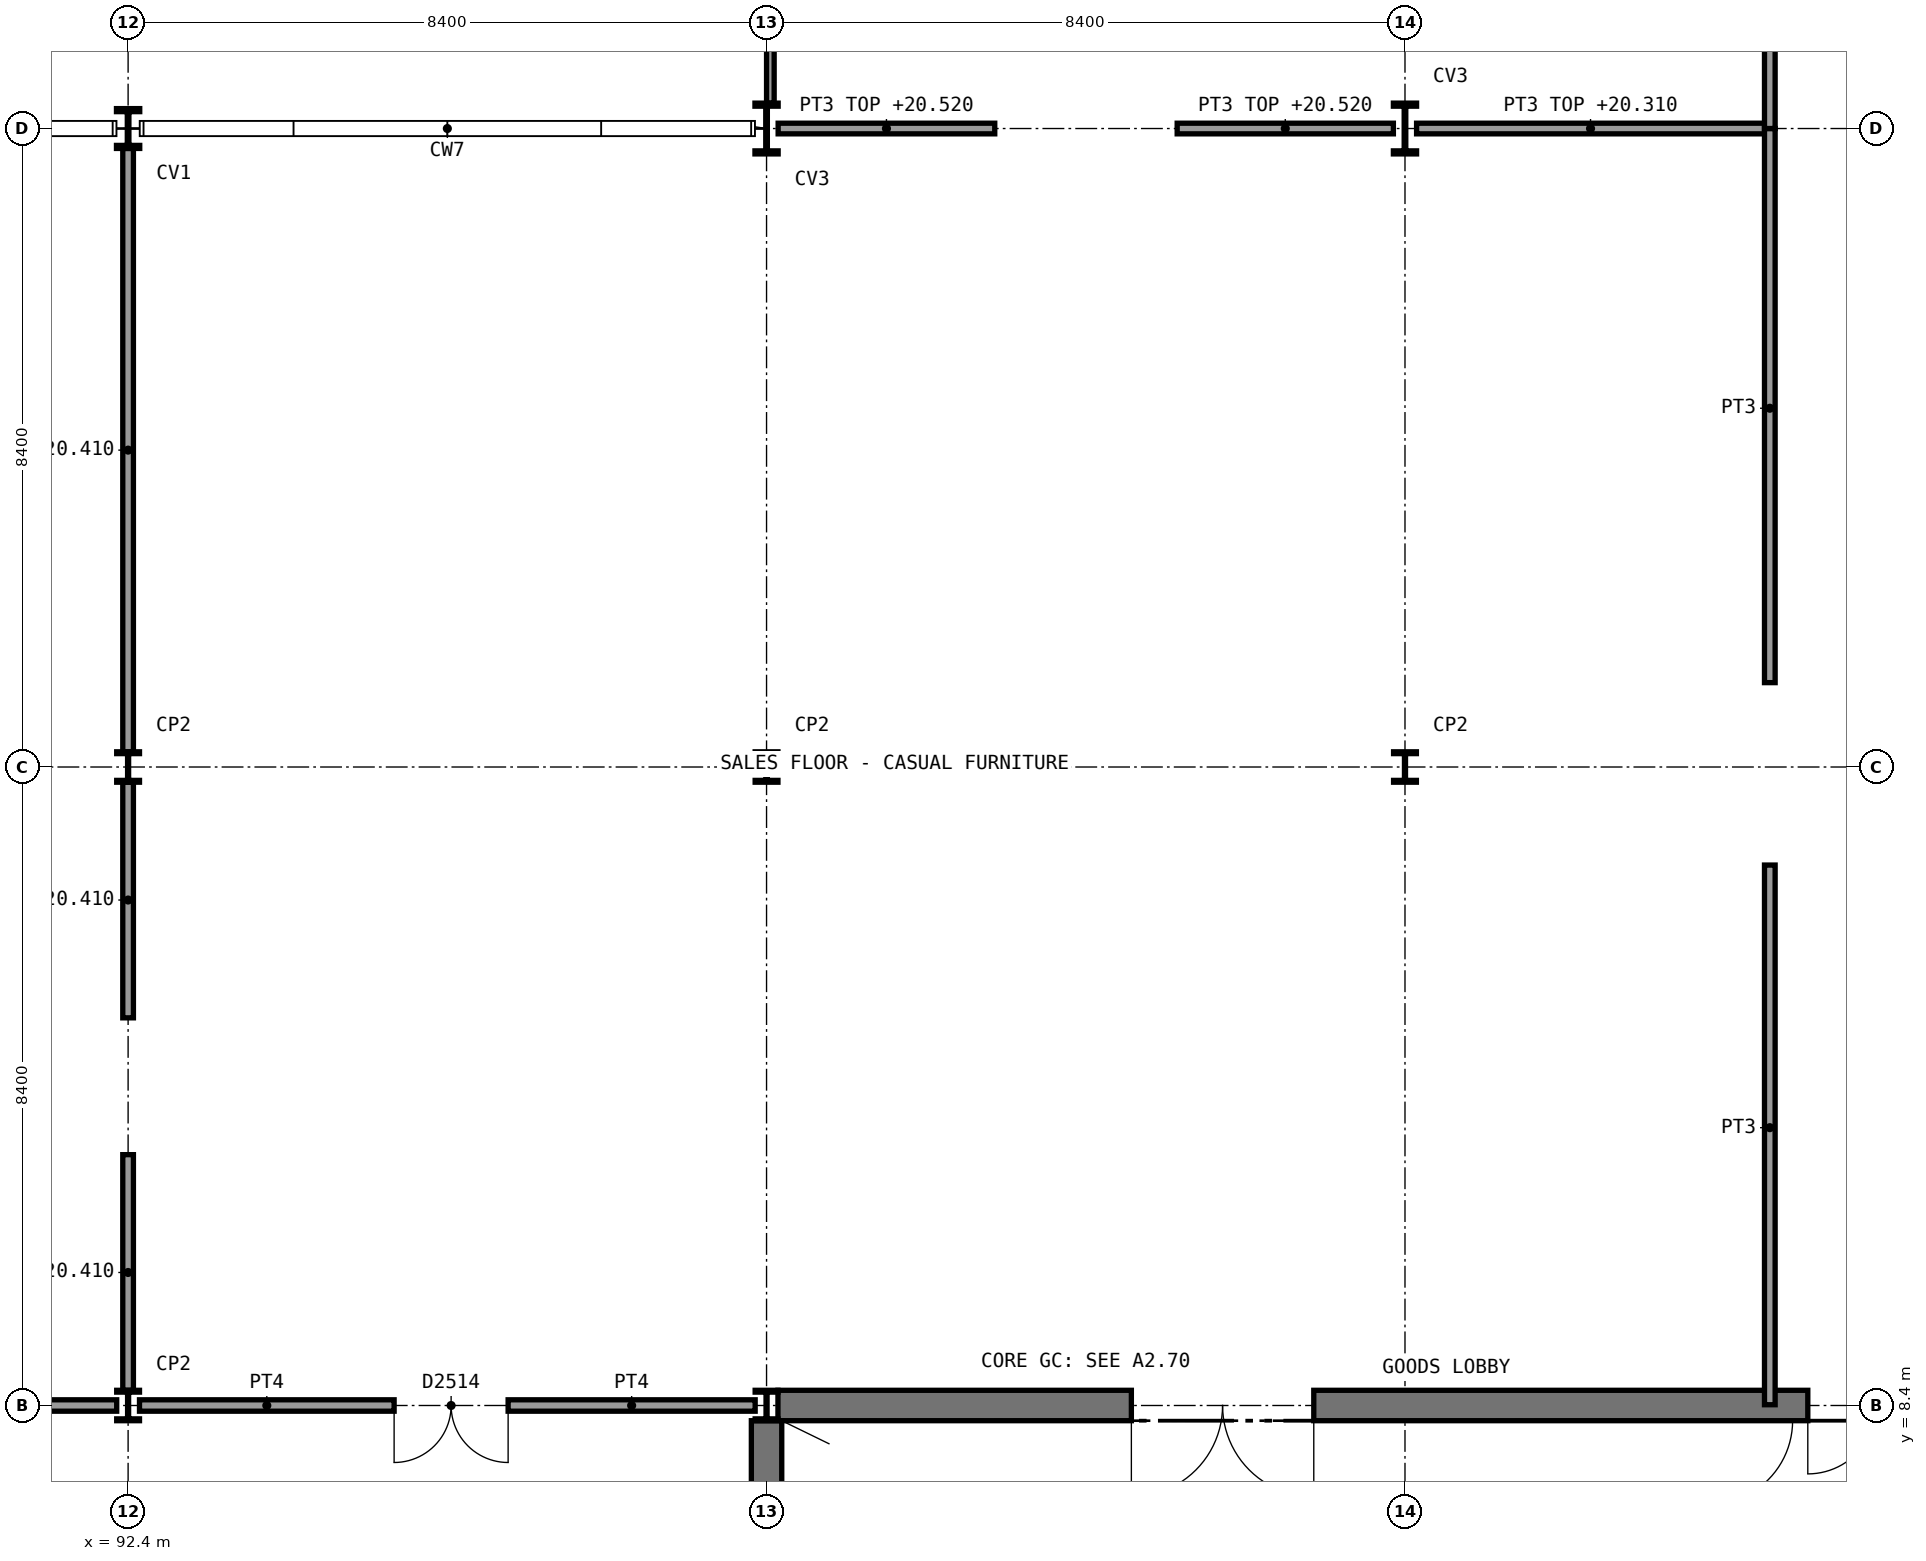
"""IFC4 building model, lengths in metres.
Left out: names, types, materials, properties, quantities, classifications, styles, units other than length and angle.
Written with IfcOpenShell. Run it as: python <this file> out.ifc"""

import sys

from ifc_helpers import new_model, si_unit, direction, frame, frame_2d, origin, origin_2d, place, context, subcontext, project, spatial, rectangle, i_section, extrude, element, fill, save


model = new_model("IFC4")
c1 = context("Model", 3, precision=1e-05, world=origin(), true_north=direction((0.0, 1.0)))
c2 = subcontext(c1, "Body", "Model", "MODEL_VIEW")
j1 = project(units=[si_unit("LENGTHUNIT", "METRE"), si_unit("PLANEANGLEUNIT", "RADIAN")], contexts=[c1])
p1 = place(None, origin())
s1 = spatial("IfcSite", under=j1, at=p1, CompositionType="ELEMENT")
p2 = place(p1, origin())
s2 = spatial("IfcBuilding", under=s1, at=p2, CompositionType="ELEMENT")
p3 = place(p2, frame((0.0, 0.0, 16.2)))
s3 = spatial("IfcBuildingStorey", under=s2, at=p3, CompositionType="ELEMENT", Elevation=16.2)
p4 = place(p3, frame((100.95, 8.4, 0.0), z_axis=(0.0, 0.0, 1.0), x_axis=(1.0, 0.0, 0.0)))
e1 = element("IfcWall", 1, at=p4, inside=s3, PredefinedType="SHEAR", context=c2, shape_type="SweptSolid", body=[
    extrude(rectangle(XDim=16.45, YDim=0.4, at=frame_2d((8.225, 0.0))), origin(), (0.0, 0.0, 1.0), 4.65),
])
p5 = place(p4, frame((13.55, 0.0, 0.0)))
e2 = element("IfcOpeningElement", 2, at=p5, cuts=e1, PredefinedType="OPENING", context=c2, shape_type="SweptSolid", body=[
    extrude(rectangle(XDim=1.8, YDim=2.1, at=frame_2d((0.9, 1.05))), frame((0.0, 0.21, 0.0), z_axis=(0.0, -1.0, 0.0), x_axis=(1.0, 0.0, 0.0)), (0.0, 0.0, 1.0), 0.42),
])
p6 = place(p4, frame((4.65, 0.0, 0.0)))
e3 = element("IfcOpeningElement", 3, at=p6, cuts=e1, PredefinedType="OPENING", context=c2, shape_type="SweptSolid", body=[
    extrude(rectangle(XDim=2.4, YDim=2.4, at=frame_2d((1.2, 1.2))), frame((0.0, 0.21, 0.0), z_axis=(0.0, -1.0, 0.0), x_axis=(1.0, 0.0, 0.0)), (0.0, 0.0, 1.0), 0.42),
])
p7 = place(p3, frame((100.8, 0.2, 0.0), z_axis=(0.0, 0.0, 1.0), x_axis=(0.0, 1.0, 0.0)))
e4 = element("IfcWall", 4, at=p7, inside=s3, PredefinedType="SHEAR", context=c2, shape_type="SweptSolid", body=[
    extrude(rectangle(XDim=8.0, YDim=0.4, at=frame_2d((4.0, 0.0))), origin(), (0.0, 0.0, 1.0), 4.65),
])
for number, where, z_axis, x_axis in (
    (5, (92.4, 8.4, 0.0), (0.0, 0.0, 1.0), (1.0, 0.0, 0.0)),
    (6, (92.4, 16.8, 0.0), (0.0, 0.0, 1.0), (1.0, 0.0, 0.0)),
):
    element("IfcColumn", number, at=place(p3, frame(where, z_axis=z_axis, x_axis=x_axis)), inside=s3, PredefinedType="COLUMN", context=c2, shape_type="SweptSolid", body=[
        extrude(i_section(OverallWidth=0.3, OverallDepth=0.4, WebThickness=0.013, FlangeThickness=0.024, FilletRadius=0.027, at=origin_2d()), origin(), (0.0, 0.0, 1.0), 4.8),
    ])
p8 = place(p3, frame((92.4, 25.2, 0.0), z_axis=(0.0, 0.0, 1.0), x_axis=(1.0, 0.0, 0.0)))
e7 = element("IfcColumn", 7, at=p8, inside=s3, PredefinedType="COLUMN", context=c2, shape_type="SweptSolid", body=[
    extrude(i_section(OverallWidth=0.306, OverallDepth=0.524, WebThickness=0.021, FlangeThickness=0.04, FilletRadius=0.027, at=origin_2d()), origin(), (0.0, 0.0, 1.0), 4.8),
])
for number, where, z_axis, x_axis in (
    (8, (100.8, 8.4, 0.0), (0.0, 0.0, 1.0), (1.0, 0.0, 0.0)),
    (9, (100.8, 16.8, 0.0), (0.0, 0.0, 1.0), (1.0, 0.0, 0.0)),
):
    element("IfcColumn", number, at=place(p3, frame(where, z_axis=z_axis, x_axis=x_axis)), inside=s3, PredefinedType="COLUMN", context=c2, shape_type="SweptSolid", body=[
        extrude(i_section(OverallWidth=0.3, OverallDepth=0.4, WebThickness=0.013, FlangeThickness=0.024, FilletRadius=0.027, at=origin_2d()), origin(), (0.0, 0.0, 1.0), 4.8),
    ])
p9 = place(p3, frame((100.8, 25.2, 0.0), z_axis=(0.0, 0.0, 1.0), x_axis=(1.0, 0.0, 0.0)))
e10 = element("IfcColumn", 10, at=p9, inside=s3, PredefinedType="COLUMN", context=c2, shape_type="SweptSolid", body=[
    extrude(i_section(OverallWidth=0.305, OverallDepth=0.668, WebThickness=0.021, FlangeThickness=0.04, FilletRadius=0.027, at=origin_2d()), origin(), (0.0, 0.0, 1.0), 4.8),
])
p10 = place(p3, frame((109.2, 16.8, 0.0), z_axis=(0.0, 0.0, 1.0), x_axis=(1.0, 0.0, 0.0)))
e11 = element("IfcColumn", 11, at=p10, inside=s3, PredefinedType="COLUMN", context=c2, shape_type="SweptSolid", body=[
    extrude(i_section(OverallWidth=0.3, OverallDepth=0.4, WebThickness=0.013, FlangeThickness=0.024, FilletRadius=0.027, at=origin_2d()), origin(), (0.0, 0.0, 1.0), 4.8),
])
p11 = place(p3, frame((109.2, 25.2, 0.0), z_axis=(0.0, 0.0, 1.0), x_axis=(1.0, 0.0, 0.0)))
e12 = element("IfcColumn", 12, at=p11, inside=s3, PredefinedType="COLUMN", context=c2, shape_type="SweptSolid", body=[
    extrude(i_section(OverallWidth=0.305, OverallDepth=0.668, WebThickness=0.021, FlangeThickness=0.04, FilletRadius=0.027, at=origin_2d()), origin(), (0.0, 0.0, 1.0), 4.8),
])
p12 = place(p3, frame((84.15, 8.4, 0.0), z_axis=(0.0, 0.0, 1.0), x_axis=(1.0, 0.0, 0.0)))
e13 = element("IfcWall", 13, at=p12, inside=s3, PredefinedType="SOLIDWALL", context=c2, shape_type="SweptSolid", body=[
    extrude(rectangle(XDim=8.1, YDim=0.15, at=frame_2d((4.05, 0.0))), origin(), (0.0, 0.0, 1.0), 4.32),
])
p13 = place(p12, frame((3.35, 0.0, 0.0)))
e14 = element("IfcOpeningElement", 14, at=p13, cuts=e13, PredefinedType="OPENING", context=c2, shape_type="SweptSolid", body=[
    extrude(rectangle(XDim=1.5, YDim=2.1, at=frame_2d((0.75, 1.05))), frame((0.0, 0.085, 0.0), z_axis=(0.0, -1.0, 0.0), x_axis=(1.0, 0.0, 0.0)), (0.0, 0.0, 1.0), 0.17),
])
p14 = place(p3, frame((92.55, 8.4, 0.0), z_axis=(0.0, 0.0, 1.0), x_axis=(1.0, 0.0, 0.0)))
e15 = element("IfcWall", 15, at=p14, inside=s3, PredefinedType="SOLIDWALL", context=c2, shape_type="SweptSolid", body=[
    extrude(rectangle(XDim=8.1, YDim=0.15, at=frame_2d((4.05, 0.0))), origin(), (0.0, 0.0, 1.0), 4.32),
])
p15 = place(p14, frame((3.35, 0.0, 0.0)))
e16 = element("IfcOpeningElement", 16, at=p15, cuts=e15, PredefinedType="OPENING", context=c2, shape_type="SweptSolid", body=[
    extrude(rectangle(XDim=1.5, YDim=2.1, at=frame_2d((0.75, 1.05))), frame((0.0, 0.085, 0.0), z_axis=(0.0, -1.0, 0.0), x_axis=(1.0, 0.0, 0.0)), (0.0, 0.0, 1.0), 0.17),
])
for number, where, z_axis, x_axis in (
    (17, (92.4, 8.6, 0.0), (0.0, 0.0, 1.0), (0.0, 1.0, 0.0)),
    (18, (92.4, 13.5, 0.0), (0.0, 0.0, 1.0), (0.0, 1.0, 0.0)),
):
    element("IfcWall", number, at=place(p3, frame(where, z_axis=z_axis, x_axis=x_axis)), inside=s3, PredefinedType="PARTITIONING", context=c2, shape_type="SweptSolid", body=[
        extrude(rectangle(XDim=3.1, YDim=0.14, at=frame_2d((1.55, 0.0))), origin(), (0.0, 0.0, 1.0), 4.21),
    ])
p16 = place(p3, frame((92.4, 17.0, 0.0), z_axis=(0.0, 0.0, 1.0), x_axis=(0.0, 1.0, 0.0)))
e19 = element("IfcWall", 19, at=p16, inside=s3, PredefinedType="PARTITIONING", context=c2, shape_type="SweptSolid", body=[
    extrude(rectangle(XDim=7.938, YDim=0.14, at=frame_2d((3.969, 0.0))), origin(), (0.0, 0.0, 1.0), 4.21),
])
p17 = place(p3, frame((100.953, 25.2, 0.0), z_axis=(0.0, 0.0, 1.0), x_axis=(1.0, 0.0, 0.0)))
e20 = element("IfcWall", 20, at=p17, inside=s3, PredefinedType="PARTITIONING", context=c2, shape_type="SweptSolid", body=[
    extrude(rectangle(XDim=2.85, YDim=0.14, at=frame_2d((1.425, 0.0))), origin(), (0.0, 0.0, 1.0), 4.32),
])
p18 = place(p3, frame((106.203, 25.2, 0.0), z_axis=(0.0, 0.0, 1.0), x_axis=(1.0, 0.0, 0.0)))
e21 = element("IfcWall", 21, at=p18, inside=s3, PredefinedType="PARTITIONING", context=c2, shape_type="SweptSolid", body=[
    extrude(rectangle(XDim=2.845, YDim=0.14, at=frame_2d((1.422, 0.0))), origin(), (0.0, 0.0, 1.0), 4.32),
])
p19 = place(p3, frame((109.353, 25.2, 0.0), z_axis=(0.0, 0.0, 1.0), x_axis=(1.0, 0.0, 0.0)))
e22 = element("IfcWall", 22, at=p19, inside=s3, PredefinedType="PARTITIONING", context=c2, shape_type="SweptSolid", body=[
    extrude(rectangle(XDim=4.647, YDim=0.14, at=frame_2d((2.324, 0.0))), origin(), (0.0, 0.0, 1.0), 4.11),
])
p20 = place(p3, frame((114.0, 8.41, 0.0), z_axis=(0.0, 0.0, 1.0), x_axis=(0.0, 1.0, 0.0)))
e23 = element("IfcWall", 23, at=p20, inside=s3, PredefinedType="PARTITIONING", context=c2, shape_type="SweptSolid", body=[
    extrude(rectangle(XDim=7.1, YDim=0.14, at=frame_2d((3.55, 0.0))), origin(), (0.0, 0.0, 1.0), 4.65),
])
p21 = place(p3, frame((114.0, 17.91, 0.0), z_axis=(0.0, 0.0, 1.0), x_axis=(0.0, 1.0, 0.0)))
e24 = element("IfcWall", 24, at=p21, inside=s3, PredefinedType="PARTITIONING", context=c2, shape_type="SweptSolid", body=[
    extrude(rectangle(XDim=7.29, YDim=0.14, at=frame_2d((3.645, 0.0))), origin(), (0.0, 0.0, 1.0), 4.65),
])
p22 = place(p3, frame((114.0, 25.2, 0.0), z_axis=(0.0, 0.0, 1.0), x_axis=(0.0, 1.0, 0.0)))
e25 = element("IfcWall", 25, at=p22, inside=s3, PredefinedType="PARTITIONING", context=c2, shape_type="SweptSolid", body=[
    extrude(rectangle(XDim=12.6, YDim=0.14, at=frame_2d((6.3, 0.0))), origin(), (0.0, 0.0, 1.0), 4.65),
])
p23 = place(p3, frame((113.2, 0.2, 0.0), z_axis=(0.0, 0.0, 1.0), x_axis=(0.0, 1.0, 0.0)))
e26 = element("IfcWall", 26, at=p23, inside=s3, PredefinedType="SHEAR", context=c2, shape_type="SweptSolid", body=[
    extrude(rectangle(XDim=8.0, YDim=0.2, at=frame_2d((4.0, 0.0))), origin(), (0.0, 0.0, 1.0), 4.65),
])
p24 = place(p23, frame((6.9, 0.0, 0.0)))
e27 = element("IfcOpeningElement", 27, at=p24, cuts=e26, PredefinedType="OPENING", context=c2, shape_type="SweptSolid", body=[
    extrude(rectangle(XDim=1.11, YDim=2.1, at=frame_2d((0.555, 1.05))), frame((0.0, 0.11, 0.0), z_axis=(0.0, -1.0, 0.0), x_axis=(1.0, 0.0, 0.0)), (0.0, 0.0, 1.0), 0.22),
])
p25 = place(p3, frame((100.85, 25.534, 0.0), z_axis=(0.0, 0.0, 1.0), x_axis=(0.0, 1.0, 0.0)))
e28 = element("IfcWall", 28, at=p25, inside=s3, PredefinedType="PARTITIONING", context=c2, shape_type="SweptSolid", body=[
    extrude(rectangle(XDim=12.027, YDim=0.1, at=frame_2d((6.014, 0.0))), origin(), (0.0, 0.0, 1.0), 3.76),
])
p26 = place(p15, frame((1.5, 0.0, 0.0), z_axis=(0.0, 0.0, 1.0), x_axis=(-1.0, 0.0, 0.0)))
e29 = element("IfcDoor", 29, at=p26, inside=s3, OperationType="DOUBLE_DOOR_SINGLE_SWING", PredefinedType="DOOR", context=c2, shape_type="SweptSolid", body=[
    extrude(rectangle(XDim=1.5, YDim=2.1, at=frame_2d((0.75, 1.05))), frame((0.0, 0.025, 0.0), z_axis=(0.0, -1.0, 0.0), x_axis=(1.0, 0.0, 0.0)), (0.0, 0.0, 1.0), 0.05),
])
fill(e16, e29)
p27 = place(p24, frame((1.1, 0.0, 0.0), z_axis=(0.0, 0.0, 1.0), x_axis=(-1.0, 0.0, 0.0)))
e30 = element("IfcDoor", 30, at=p27, inside=s3, OperationType="SINGLE_SWING_LEFT", PredefinedType="DOOR", context=c2, shape_type="SweptSolid", body=[
    extrude(rectangle(XDim=1.1, YDim=2.1, at=frame_2d((0.55, 1.05))), frame((0.0, 0.025, 0.0), z_axis=(0.0, -1.0, 0.0), x_axis=(1.0, 0.0, 0.0)), (0.0, 0.0, 1.0), 0.05),
])
fill(e27, e30)
p28 = place(p5, frame((1.8, 0.0, 0.0), z_axis=(0.0, 0.0, 1.0), x_axis=(-1.0, 0.0, 0.0)))
e31 = element("IfcDoor", 31, at=p28, inside=s3, OperationType="DOUBLE_DOOR_SINGLE_SWING", PredefinedType="DOOR", context=c2, shape_type="SweptSolid", body=[
    extrude(rectangle(XDim=1.8, YDim=2.1, at=frame_2d((0.9, 1.05))), frame((0.0, 0.025, 0.0), z_axis=(0.0, -1.0, 0.0), x_axis=(1.0, 0.0, 0.0)), (0.0, 0.0, 1.0), 0.05),
])
fill(e2, e31)
p29 = place(p6, frame((2.4, 0.0, 0.0), z_axis=(0.0, 0.0, 1.0), x_axis=(-1.0, 0.0, 0.0)))
e32 = element("IfcDoor", 32, at=p29, inside=s3, OperationType="DOUBLE_DOOR_SINGLE_SWING", PredefinedType="DOOR", context=c2, shape_type="SweptSolid", body=[
    extrude(rectangle(XDim=2.4, YDim=2.4, at=frame_2d((1.2, 1.2))), frame((0.0, 0.025, 0.0), z_axis=(0.0, -1.0, 0.0), x_axis=(1.0, 0.0, 0.0)), (0.0, 0.0, 1.0), 0.05),
])
fill(e3, e32)
save(model, sys.argv[1])
